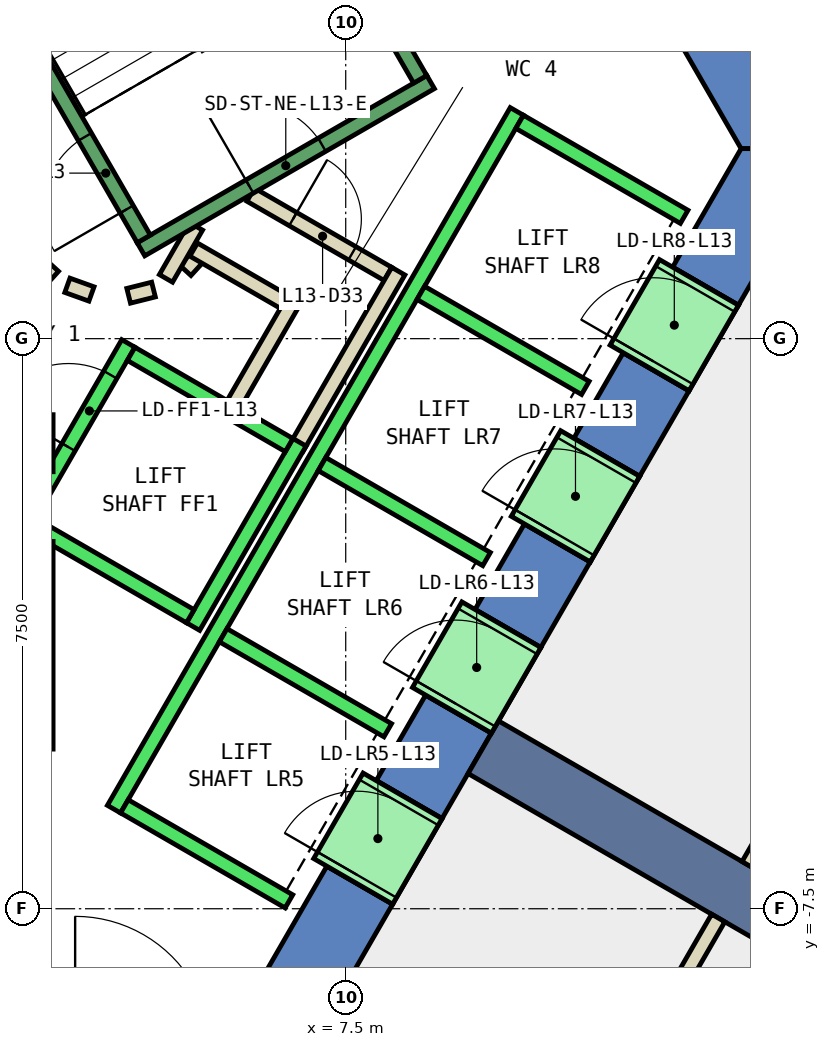
"""IFC4 building model, lengths in metres.
Left out: names, types, materials, properties, quantities, classifications, styles, units other than length and angle.
Written with IfcOpenShell. Run it as: python <this file> out.ifc"""

import sys

from ifc_helpers import new_model, si_unit, direction, frame, frame_2d, origin, place, context, subcontext, project, spatial, polyline, rectangle, outline, extrude, element, fill, save


model = new_model("IFC4")
c1 = context("Model", 3, precision=1e-05, world=origin(), true_north=direction((0.0, 1.0)))
c2 = subcontext(c1, "Body", "Model", "MODEL_VIEW")
j1 = project(units=[si_unit("LENGTHUNIT", "METRE"), si_unit("PLANEANGLEUNIT", "RADIAN")], contexts=[c1])
p1 = place(None, origin())
s1 = spatial("IfcSite", under=j1, at=p1, CompositionType="ELEMENT")
p2 = place(p1, origin())
s2 = spatial("IfcBuilding", under=s1, at=p2, CompositionType="ELEMENT")
p3 = place(p2, frame((0.0, 0.0, 64.4)))
s3 = spatial("IfcBuildingStorey", under=s2, at=p3, CompositionType="ELEMENT", Elevation=64.4)
p4 = place(p3, frame((0.0, 0.0, -0.4)))
e1 = element("IfcWall", 1, at=p4, inside=s3, PredefinedType="SHEAR", context=c2, shape_type="SweptSolid", body=[
    extrude(outline(polyline([(8.517, 11.748), (7.651, 11.248), (12.702, 2.5), (13.856, 2.5), (8.517, 11.748)])), origin(), (0.0, 0.0, 1.0), 4.2),
])
p5 = place(p3, frame((0.0, 0.0, -0.4)))
e2 = element("IfcWall", 2, at=p5, inside=s3, PredefinedType="SHEAR", context=c2, shape_type="SweptSolid", body=[
    extrude(outline(polyline([(8.117, -7.44), (7.252, -6.94), (6.351, -8.5), (6.928, -9.5), (8.117, -7.44)])), origin(), (0.0, 0.0, 1.0), 4.2),
])
p6 = place(p3, frame((0.0, 0.0, -0.4)))
e3 = element("IfcWall", 3, at=p6, inside=s3, PredefinedType="SHEAR", context=c2, shape_type="SweptSolid", body=[
    extrude(outline(polyline([(9.417, -5.189), (8.551, -4.689), (7.902, -5.814), (8.767, -6.314), (9.417, -5.189)])), origin(), (0.0, 0.0, 1.0), 4.2),
])
p7 = place(p3, frame((0.0, 0.0, -0.4)))
e4 = element("IfcWall", 4, at=p7, inside=s3, PredefinedType="SHEAR", context=c2, shape_type="SweptSolid", body=[
    extrude(outline(polyline([(10.717, -2.937), (9.851, -2.437), (9.201, -3.563), (10.067, -4.063), (10.717, -2.937)])), origin(), (0.0, 0.0, 1.0), 4.2),
])
p8 = place(p3, frame((0.0, 0.0, -0.4)))
e5 = element("IfcWall", 5, at=p8, inside=s3, PredefinedType="SHEAR", context=c2, shape_type="SweptSolid", body=[
    extrude(outline(polyline([(12.017, -0.686), (11.151, -0.186), (10.501, -1.311), (11.367, -1.811), (12.017, -0.686)])), origin(), (0.0, 0.0, 1.0), 4.2),
])
p9 = place(p3, frame((0.0, 0.0, -0.4)))
e6 = element("IfcWall", 6, at=p9, inside=s3, PredefinedType="SHEAR", context=c2, shape_type="SweptSolid", body=[
    extrude(outline(polyline([(11.801, 0.94), (12.667, 0.44), (13.856, 2.5), (12.702, 2.5), (11.801, 0.94)])), origin(), (0.0, 0.0, 1.0), 4.2),
])
p10 = place(p3, frame((0.0, 0.0, 3.6)))
e7 = element("IfcWall", 7, at=p10, inside=s3, PredefinedType="SHEAR", context=c2, shape_type="SweptSolid", body=[
    extrude(outline(polyline([(8.767, -6.314), (7.902, -5.814), (7.252, -6.94), (8.117, -7.44), (8.767, -6.314)])), origin(), (0.0, 0.0, 1.0), 0.2),
])
p11 = place(p3, frame((0.0, 0.0, 3.6)))
e8 = element("IfcWall", 8, at=p11, inside=s3, PredefinedType="SHEAR", context=c2, shape_type="SweptSolid", body=[
    extrude(outline(polyline([(10.067, -4.063), (9.201, -3.563), (8.551, -4.689), (9.417, -5.189), (10.067, -4.063)])), origin(), (0.0, 0.0, 1.0), 0.2),
])
p12 = place(p3, frame((0.0, 0.0, 3.6)))
e9 = element("IfcWall", 9, at=p12, inside=s3, PredefinedType="SHEAR", context=c2, shape_type="SweptSolid", body=[
    extrude(outline(polyline([(11.367, -1.811), (10.501, -1.311), (9.851, -2.437), (10.717, -2.937), (11.367, -1.811)])), origin(), (0.0, 0.0, 1.0), 0.2),
])
p13 = place(p3, frame((0.0, 0.0, 3.6)))
e10 = element("IfcWall", 10, at=p13, inside=s3, PredefinedType="SHEAR", context=c2, shape_type="SweptSolid", body=[
    extrude(outline(polyline([(12.667, 0.44), (11.801, 0.94), (11.151, -0.186), (12.017, -0.686), (12.667, 0.44)])), origin(), (0.0, 0.0, 1.0), 0.2),
])
p14 = place(p3, frame((9.31, -5.375, -0.4), z_axis=(0.0, 0.0, 1.0), x_axis=(0.866017533419, -0.500013631625, 0.0)))
e11 = element("IfcWall", 11, at=p14, inside=s3, PredefinedType="SHEAR", context=c2, shape_type="SweptSolid", body=[
    extrude(rectangle(XDim=9.0, YDim=0.8, at=frame_2d((4.5, 0.0))), origin(), (0.0, 0.0, 1.0), 4.2),
])
p15 = place(p3, frame((5.39, 0.898, 0.0), z_axis=(0.0, 0.0, 1.0), x_axis=(0.673828488714, 0.738887791073, 0.0)))
e12 = element("IfcWall", 12, at=p15, inside=s3, PredefinedType="PARTITIONING", context=c2, shape_type="SweptSolid", body=[
    extrude(rectangle(XDim=0.263, YDim=0.2, at=frame_2d((0.131, 0.0))), origin(), (0.0, 0.0, 1.0), 3.8),
])
p16 = place(p3, frame((5.499, 1.172, 0.0), z_axis=(0.0, 0.0, 1.0), x_axis=(0.866333505267, -0.499465972466, 0.0)))
e13 = element("IfcWall", 13, at=p16, inside=s3, PredefinedType="PARTITIONING", context=c2, shape_type="SweptSolid", body=[
    extrude(rectangle(XDim=1.374, YDim=0.2, at=frame_2d((0.687, 0.0))), origin(), (0.0, 0.0, 1.0), 3.8),
])
p17 = place(p3, frame((6.826, 0.522, 0.0), z_axis=(0.0, 0.0, 1.0), x_axis=(-0.500016722714, -0.866015748706, 0.0)))
e14 = element("IfcWall", 14, at=p17, inside=s3, PredefinedType="PARTITIONING", context=c2, shape_type="SweptSolid", body=[
    extrude(rectangle(XDim=1.7, YDim=0.2, at=frame_2d((0.85, 0.0))), origin(), (0.0, 0.0, 1.0), 3.8),
])
p18 = place(p3, frame((6.25, 1.894, 0.0), z_axis=(0.0, 0.0, 1.0), x_axis=(0.866043184279, -0.499969202016, 0.0)))
e15 = element("IfcWall", 15, at=p18, inside=s3, PredefinedType="PARTITIONING", context=c2, shape_type="SweptSolid", body=[
    extrude(rectangle(XDim=2.084, YDim=0.2, at=frame_2d((1.042, 0.0))), origin(), (0.0, 0.0, 1.0), 3.8),
])
p19 = place(p18, frame((0.642, 0.0, 0.0)))
e16 = element("IfcOpeningElement", 16, at=p19, cuts=e15, PredefinedType="OPENING", context=c2, shape_type="SweptSolid", body=[
    extrude(rectangle(XDim=0.9, YDim=2.1, at=frame_2d((0.45, 1.05))), frame((0.0, 0.11, 0.0), z_axis=(0.0, -1.0, 0.0), x_axis=(1.0, 0.0, 0.0)), (0.0, 0.0, 1.0), 0.22),
])
p20 = place(p3, frame((8.192, 0.888, 0.0), z_axis=(0.0, 0.0, 1.0), x_axis=(-0.499940625693, -0.866059680843, 0.0)))
e17 = element("IfcWall", 17, at=p20, inside=s3, PredefinedType="PARTITIONING", context=c2, shape_type="SweptSolid", body=[
    extrude(rectangle(XDim=2.68, YDim=0.2, at=frame_2d((1.34, 0.0))), origin(), (0.0, 0.0, 1.0), 3.8),
])
p21 = place(p3, frame((5.135, 0.793, 0.0), z_axis=(0.0, 0.0, 1.0), x_axis=(0.499526442893, 0.866298639529, 0.0)))
e18 = element("IfcWall", 18, at=p21, inside=s3, PredefinedType="PARTITIONING", context=c2, shape_type="SweptSolid", body=[
    extrude(rectangle(XDim=0.791, YDim=0.2, at=frame_2d((0.396, 0.0))), origin(), (0.0, 0.0, 1.0), 3.8),
])
p22 = place(p3, frame((3.404, 1.039, 0.0), z_axis=(0.0, 0.0, 1.0), x_axis=(0.740267097712, -0.672312891476, 0.0)))
e19 = element("IfcWall", 19, at=p22, inside=s3, PredefinedType="PARTITIONING", context=c2, shape_type="SweptSolid", body=[
    extrude(rectangle(XDim=0.338, YDim=0.2, at=frame_2d((0.169, 0.0))), origin(), (0.0, 0.0, 1.0), 3.8),
])
p23 = place(p3, frame((3.838, 0.702, 0.0), z_axis=(0.0, 0.0, 1.0), x_axis=(0.941035081519, -0.338308993895, 0.0)))
e20 = element("IfcWall", 20, at=p23, inside=s3, PredefinedType="PARTITIONING", context=c2, shape_type="SweptSolid", body=[
    extrude(rectangle(XDim=0.337, YDim=0.2, at=frame_2d((0.168, 0.0))), origin(), (0.0, 0.0, 1.0), 3.8),
])
p24 = place(p3, frame((4.644, 0.564, 0.0), z_axis=(0.0, 0.0, 1.0), x_axis=(0.969929076366, 0.243387729394, 0.0)))
e21 = element("IfcWall", 21, at=p24, inside=s3, PredefinedType="PARTITIONING", context=c2, shape_type="SweptSolid", body=[
    extrude(rectangle(XDim=0.337, YDim=0.2, at=frame_2d((0.168, 0.0))), origin(), (0.0, 0.0, 1.0), 3.8),
])
p25 = place(p3, frame((19.81, 5.211, 0.0), z_axis=(0.0, 0.0, 1.0), x_axis=(-0.500003368273, -0.866023459102, 0.0)))
e22 = element("IfcWall", 22, at=p25, inside=s3, PredefinedType="PARTITIONING", context=c2, shape_type="SweptSolid", body=[
    extrude(rectangle(XDim=14.018, YDim=0.2, at=frame_2d((7.009, 0.0))), origin(), (0.0, 0.0, 1.0), 3.8),
])
p26 = place(p3, frame((12.401, -7.622, 0.0), z_axis=(0.0, 0.0, 1.0), x_axis=(-0.500029185841, -0.866008552675, 0.0)))
e23 = element("IfcWall", 23, at=p26, inside=s3, PredefinedType="PARTITIONING", context=c2, shape_type="SweptSolid", body=[
    extrude(rectangle(XDim=9.301, YDim=0.2, at=frame_2d((4.651, 0.0))), origin(), (0.0, 0.0, 1.0), 3.8),
])
p27 = place(p3, frame((3.24, -2.488, 0.0), z_axis=(0.0, 0.0, 1.0), x_axis=(0.49994636267, 0.866056369097, 0.0)))
e24 = element("IfcWall", 24, at=p27, inside=s3, PredefinedType="STANDARD", context=c2, shape_type="SweptSolid", body=[
    extrude(rectangle(XDim=2.8, YDim=0.2, at=frame_2d((1.4, 0.0))), origin(), (0.0, 0.0, 1.0), 3.8),
])
p28 = place(p27, frame((1.225, 0.0, 0.0)))
e25 = element("IfcOpeningElement", 25, at=p28, cuts=e24, PredefinedType="OPENING", context=c2, shape_type="SweptSolid", body=[
    extrude(rectangle(XDim=1.1, YDim=2.1, at=frame_2d((0.55, 1.05))), frame((0.0, 0.11, 0.0), z_axis=(0.0, -1.0, 0.0), x_axis=(1.0, 0.0, 0.0)), (0.0, 0.0, 1.0), 0.22),
])
p29 = place(p3, frame((5.492, -3.788, 0.0), z_axis=(0.0, 0.0, 1.0), x_axis=(0.500011755427, 0.866018616679, 0.0)))
e26 = element("IfcWall", 26, at=p29, inside=s3, PredefinedType="STANDARD", context=c2, shape_type="SweptSolid", body=[
    extrude(rectangle(XDim=2.8, YDim=0.2, at=frame_2d((1.4, 0.0))), origin(), (0.0, 0.0, 1.0), 3.8),
])
p30 = place(p3, frame((3.377, -2.452, 0.0), z_axis=(0.0, 0.0, 1.0), x_axis=(0.865955154139, -0.50012165622, 0.0)))
e27 = element("IfcWall", 27, at=p30, inside=s3, PredefinedType="STANDARD", context=c2, shape_type="SweptSolid", body=[
    extrude(rectangle(XDim=2.4, YDim=0.2, at=frame_2d((1.2, 0.0))), origin(), (0.0, 0.0, 1.0), 3.8),
])
p31 = place(p3, frame((4.677, -0.2, 0.0), z_axis=(0.0, 0.0, 1.0), x_axis=(0.865973769406, -0.500089422704, 0.0)))
e28 = element("IfcWall", 28, at=p31, inside=s3, PredefinedType="STANDARD", context=c2, shape_type="SweptSolid", body=[
    extrude(rectangle(XDim=2.399, YDim=0.2, at=frame_2d((1.2, 0.0))), origin(), (0.0, 0.0, 1.0), 3.8),
])
p32 = place(p3, frame((4.451, -6.19, 0.0), z_axis=(0.0, 0.0, 1.0), x_axis=(0.50000090737, 0.866024879913, 0.0)))
e29 = element("IfcWall", 29, at=p32, inside=s3, PredefinedType="STANDARD", context=c2, shape_type="SweptSolid", body=[
    extrude(rectangle(XDim=10.6, YDim=0.2, at=frame_2d((5.3, 0.0))), origin(), (0.0, 0.0, 1.0), 3.8),
])
for number, where, z_axis, x_axis in (
    (30, (4.588, -6.153, 0.0), (0.0, 0.0, 1.0), (0.866, -0.5, 0.0)),
    (31, (5.888, -3.902, 0.0), (0.0, 0.0, 1.0), (0.866, -0.5, 0.0)),
    (32, (7.188, -1.65, 0.0), (0.0, 0.0, 1.0), (0.866, -0.5, 0.0)),
    (33, (8.488, 0.602, 0.0), (0.0, 0.0, 1.0), (0.866, -0.5, 0.0)),
):
    element("IfcWall", number, at=place(p3, frame(where, z_axis=z_axis, x_axis=x_axis)), inside=s3, PredefinedType="STANDARD", context=c2, shape_type="SweptSolid", body=[
        extrude(rectangle(XDim=2.5, YDim=0.2, at=frame_2d((1.25, 0.0))), origin(), (0.0, 0.0, 1.0), 3.8),
    ])
p33 = place(p3, frame((9.788, 2.853, 0.0), z_axis=(0.0, 0.0, 1.0), x_axis=(0.865998541277, -0.500046524342, 0.0)))
e34 = element("IfcWall", 34, at=p33, inside=s3, PredefinedType="STANDARD", context=c2, shape_type="SweptSolid", body=[
    extrude(rectangle(XDim=2.5, YDim=0.2, at=frame_2d((1.25, 0.0))), origin(), (0.0, 0.0, 1.0), 3.8),
])
p34 = place(p3, frame((7.598, -7.14, 0.0), z_axis=(0.0, 0.0, 1.0), x_axis=(0.500362116554, 0.865816234728, 0.0)))
e35 = element("IfcWall", 35, at=p34, inside=s3, PredefinedType="STANDARD", context=c2, shape_type="SweptSolid", body=[
    extrude(rectangle(XDim=1.299, YDim=1.2, at=frame_2d((0.65, 0.0))), origin(), (0.0, 0.0, 1.0), 2.4),
])
p35 = place(p34, frame((0.1, 0.0, 0.0)))
e36 = element("IfcOpeningElement", 36, at=p35, cuts=e35, PredefinedType="OPENING", context=c2, shape_type="SweptSolid", body=[
    extrude(rectangle(XDim=1.1, YDim=2.3, at=frame_2d((0.55, 1.15))), frame((0.0, 0.61, 0.0), z_axis=(0.0, -1.0, 0.0), x_axis=(1.0, 0.0, 0.0)), (0.0, 0.0, 1.0), 1.22),
])
p36 = place(p3, frame((8.898, -4.889, 0.0), z_axis=(0.0, 0.0, 1.0), x_axis=(0.500036693733, 0.866004217611, 0.0)))
e37 = element("IfcWall", 37, at=p36, inside=s3, PredefinedType="STANDARD", context=c2, shape_type="SweptSolid", body=[
    extrude(rectangle(XDim=1.3, YDim=1.2, at=frame_2d((0.65, 0.0))), origin(), (0.0, 0.0, 1.0), 2.4),
])
p37 = place(p36, frame((0.1, 0.0, 0.0)))
e38 = element("IfcOpeningElement", 38, at=p37, cuts=e37, PredefinedType="OPENING", context=c2, shape_type="SweptSolid", body=[
    extrude(rectangle(XDim=1.1, YDim=2.3, at=frame_2d((0.55, 1.15))), frame((0.0, 0.61, 0.0), z_axis=(0.0, -1.0, 0.0), x_axis=(1.0, 0.0, 0.0)), (0.0, 0.0, 1.0), 1.22),
])
p38 = place(p3, frame((10.198, -2.637, 0.0), z_axis=(0.0, 0.0, 1.0), x_axis=(0.49989585183, 0.866085525409, 0.0)))
e39 = element("IfcWall", 39, at=p38, inside=s3, PredefinedType="STANDARD", context=c2, shape_type="SweptSolid", body=[
    extrude(rectangle(XDim=1.3, YDim=1.2, at=frame_2d((0.65, 0.0))), origin(), (0.0, 0.0, 1.0), 2.4),
])
p39 = place(p38, frame((0.1, 0.0, 0.0)))
e40 = element("IfcOpeningElement", 40, at=p39, cuts=e39, PredefinedType="OPENING", context=c2, shape_type="SweptSolid", body=[
    extrude(rectangle(XDim=1.1, YDim=2.3, at=frame_2d((0.55, 1.15))), frame((0.0, 0.61, 0.0), z_axis=(0.0, -1.0, 0.0), x_axis=(1.0, 0.0, 0.0)), (0.0, 0.0, 1.0), 1.22),
])
p40 = place(p3, frame((11.498, -0.385, 0.0), z_axis=(0.0, 0.0, 1.0), x_axis=(0.500221244143, 0.865897630733, 0.0)))
e41 = element("IfcWall", 41, at=p40, inside=s3, PredefinedType="STANDARD", context=c2, shape_type="SweptSolid", body=[
    extrude(rectangle(XDim=1.299, YDim=1.2, at=frame_2d((0.65, 0.0))), origin(), (0.0, 0.0, 1.0), 2.4),
])
p41 = place(p40, frame((0.1, 0.0, 0.0)))
e42 = element("IfcOpeningElement", 42, at=p41, cuts=e41, PredefinedType="OPENING", context=c2, shape_type="SweptSolid", body=[
    extrude(rectangle(XDim=1.1, YDim=2.3, at=frame_2d((0.55, 1.15))), frame((0.0, 0.61, 0.0), z_axis=(0.0, -1.0, 0.0), x_axis=(1.0, 0.0, 0.0)), (0.0, 0.0, 1.0), 1.22),
])
p42 = place(p3, frame((3.55, -2.667, 0.0), z_axis=(0.0, 0.0, 1.0), x_axis=(0.0, -1.0, 0.0)))
e43 = element("IfcWall", 43, at=p42, inside=s3, PredefinedType="STANDARD", context=c2, shape_type="SweptSolid", body=[
    extrude(rectangle(XDim=2.733, YDim=0.2, at=frame_2d((1.366, 0.0))), origin(), (0.0, 0.0, 1.0), 3.8),
])
p43 = place(p3, frame((3.55, -1.0, 0.0), z_axis=(0.0, 0.0, 1.0), x_axis=(0.0, -1.0, 0.0)))
e44 = element("IfcWall", 44, at=p43, inside=s3, PredefinedType="STANDARD", context=c2, shape_type="SweptSolid", body=[
    extrude(rectangle(XDim=0.751, YDim=0.2, at=frame_2d((0.375, 0.0))), origin(), (0.0, 0.0, 1.0), 3.8),
])
p44 = place(p3, frame((4.806, 1.176, 0.0), z_axis=(0.0, 0.0, 1.0), x_axis=(0.866059941101, 0.499940174841, 0.0)))
e45 = element("IfcWall", 45, at=p44, inside=s3, PredefinedType="STANDARD", context=c2, shape_type="SweptSolid", body=[
    extrude(rectangle(XDim=4.4, YDim=0.2, at=frame_2d((2.2, 0.0))), origin(), (0.0, 0.0, 1.0), 3.8),
])
p45 = place(p44, frame((1.65, 0.0, 0.0)))
e46 = element("IfcOpeningElement", 46, at=p45, cuts=e45, PredefinedType="OPENING", context=c2, shape_type="SweptSolid", body=[
    extrude(rectangle(XDim=1.1, YDim=2.2, at=frame_2d((0.55, 1.1))), frame((0.0, 0.11, 0.0), z_axis=(0.0, -1.0, 0.0), x_axis=(1.0, 0.0, 0.0)), (0.0, 0.0, 1.0), 0.22),
])
p46 = place(p3, frame((4.843, 1.312, 0.0), z_axis=(0.0, 0.0, 1.0), x_axis=(-0.499963383562, 0.866046543262, 0.0)))
e47 = element("IfcWall", 47, at=p46, inside=s3, PredefinedType="STANDARD", context=c2, shape_type="SweptSolid", body=[
    extrude(rectangle(XDim=6.9, YDim=0.2, at=frame_2d((3.45, 0.0))), origin(), (0.0, 0.0, 1.0), 3.8),
])
p47 = place(p46, frame((0.45, 0.0, 0.0)))
e48 = element("IfcOpeningElement", 48, at=p47, cuts=e47, PredefinedType="OPENING", context=c2, shape_type="SweptSolid", body=[
    extrude(rectangle(XDim=1.1, YDim=2.2, at=frame_2d((0.55, 1.1))), frame((0.0, 0.11, 0.0), z_axis=(0.0, -1.0, 0.0), x_axis=(1.0, 0.0, 0.0)), (0.0, 0.0, 1.0), 0.22),
])
p48 = place(p3, frame((8.48, 3.412, 0.0), z_axis=(0.0, 0.0, 1.0), x_axis=(-0.499978703459, 0.866037698999, 0.0)))
e49 = element("IfcWall", 49, at=p48, inside=s3, PredefinedType="STANDARD", context=c2, shape_type="SweptSolid", body=[
    extrude(rectangle(XDim=6.9, YDim=0.2, at=frame_2d((3.45, 0.0))), origin(), (0.0, 0.0, 1.0), 3.8),
])
p49 = place(p19, origin())
e50 = element("IfcDoor", 50, at=p49, inside=s3, OperationType="SINGLE_SWING_LEFT", PredefinedType="DOOR", context=c2, shape_type="SweptSolid", body=[
    extrude(rectangle(XDim=0.9, YDim=2.1, at=frame_2d((0.45, 1.05))), frame((0.0, 0.025, 0.0), z_axis=(0.0, -1.0, 0.0), x_axis=(1.0, 0.0, 0.0)), (0.0, 0.0, 1.0), 0.05),
])
fill(e16, e50)
p50 = place(p35, origin())
e51 = element("IfcDoor", 51, at=p50, inside=s3, OperationType="SLIDING_TO_LEFT", PredefinedType="DOOR", context=c2, shape_type="SweptSolid", body=[
    extrude(rectangle(XDim=1.1, YDim=2.3, at=frame_2d((0.55, 1.15))), frame((0.0, 0.025, 0.0), z_axis=(0.0, -1.0, 0.0), x_axis=(1.0, 0.0, 0.0)), (0.0, 0.0, 1.0), 0.05),
])
fill(e36, e51)
p51 = place(p37, origin())
e52 = element("IfcDoor", 52, at=p51, inside=s3, OperationType="SLIDING_TO_LEFT", PredefinedType="DOOR", context=c2, shape_type="SweptSolid", body=[
    extrude(rectangle(XDim=1.1, YDim=2.3, at=frame_2d((0.55, 1.15))), frame((0.0, 0.025, 0.0), z_axis=(0.0, -1.0, 0.0), x_axis=(1.0, 0.0, 0.0)), (0.0, 0.0, 1.0), 0.05),
])
fill(e38, e52)
p52 = place(p39, origin())
e53 = element("IfcDoor", 53, at=p52, inside=s3, OperationType="SLIDING_TO_LEFT", PredefinedType="DOOR", context=c2, shape_type="SweptSolid", body=[
    extrude(rectangle(XDim=1.1, YDim=2.3, at=frame_2d((0.55, 1.15))), frame((0.0, 0.025, 0.0), z_axis=(0.0, -1.0, 0.0), x_axis=(1.0, 0.0, 0.0)), (0.0, 0.0, 1.0), 0.05),
])
fill(e40, e53)
p53 = place(p41, origin())
e54 = element("IfcDoor", 54, at=p53, inside=s3, OperationType="SLIDING_TO_LEFT", PredefinedType="DOOR", context=c2, shape_type="SweptSolid", body=[
    extrude(rectangle(XDim=1.1, YDim=2.3, at=frame_2d((0.55, 1.15))), frame((0.0, 0.025, 0.0), z_axis=(0.0, -1.0, 0.0), x_axis=(1.0, 0.0, 0.0)), (0.0, 0.0, 1.0), 0.05),
])
fill(e42, e54)
p54 = place(p28, origin())
e55 = element("IfcDoor", 55, at=p54, inside=s3, OperationType="SLIDING_TO_LEFT", PredefinedType="DOOR", context=c2, shape_type="SweptSolid", body=[
    extrude(rectangle(XDim=1.1, YDim=2.1, at=frame_2d((0.55, 1.05))), frame((0.0, 0.025, 0.0), z_axis=(0.0, -1.0, 0.0), x_axis=(1.0, 0.0, 0.0)), (0.0, 0.0, 1.0), 0.05),
])
fill(e25, e55)
p55 = place(p47, origin())
e56 = element("IfcDoor", 56, at=p55, inside=s3, OperationType="SINGLE_SWING_LEFT", PredefinedType="DOOR", context=c2, shape_type="SweptSolid", body=[
    extrude(rectangle(XDim=1.1, YDim=2.2, at=frame_2d((0.55, 1.1))), frame((0.0, 0.025, 0.0), z_axis=(0.0, -1.0, 0.0), x_axis=(1.0, 0.0, 0.0)), (0.0, 0.0, 1.0), 0.05),
])
fill(e48, e56)
p56 = place(p45, origin())
e57 = element("IfcDoor", 57, at=p56, inside=s3, OperationType="SINGLE_SWING_LEFT", PredefinedType="DOOR", context=c2, shape_type="SweptSolid", body=[
    extrude(rectangle(XDim=1.1, YDim=2.2, at=frame_2d((0.55, 1.1))), frame((0.0, 0.025, 0.0), z_axis=(0.0, -1.0, 0.0), x_axis=(1.0, 0.0, 0.0)), (0.0, 0.0, 1.0), 0.05),
])
fill(e46, e57)
save(model, sys.argv[1])
